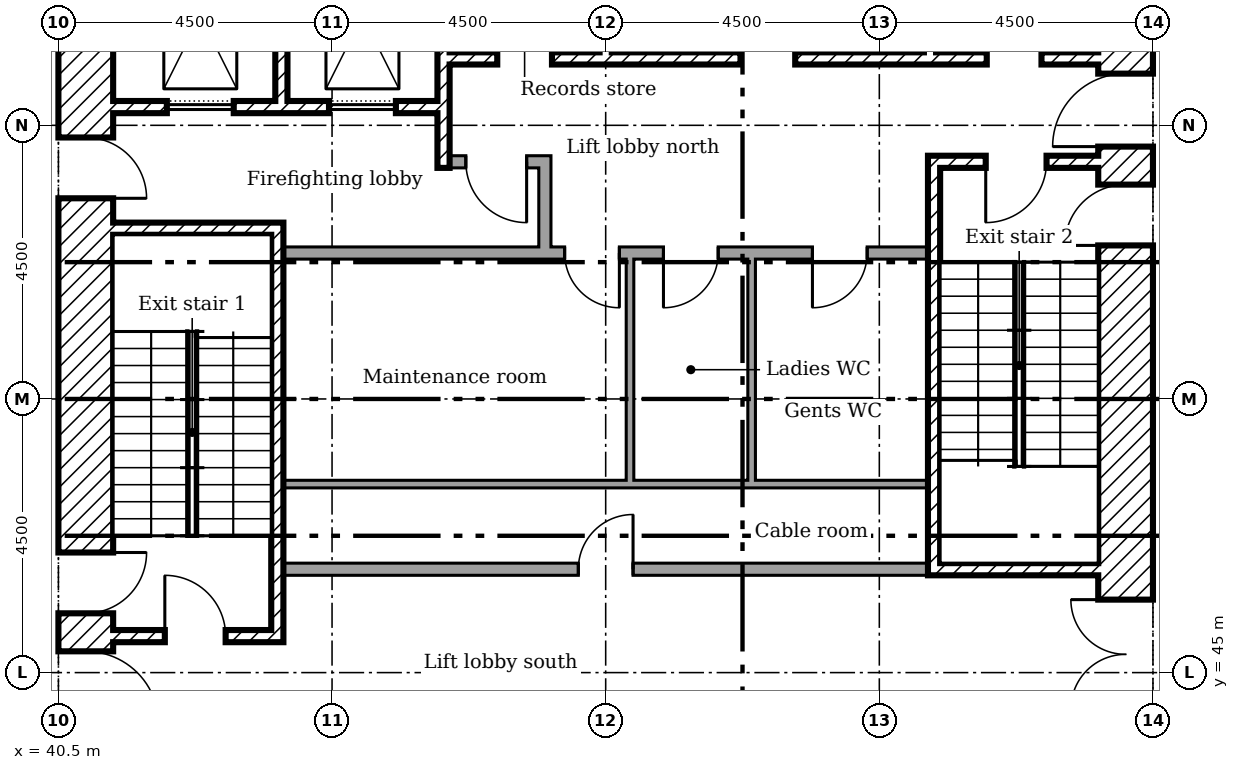
"""IFC4 building model, lengths in metres.
Left out: names, types, materials, properties, quantities, classifications, styles, units other than length and angle.
Written with IfcOpenShell. Run it as: python <this file> out.ifc"""

import sys

from ifc_helpers import new_model, si_unit, direction, frame, frame_2d, origin, place, context, subcontext, project, spatial, rectangle, extrude, element, fill, save


model = new_model("IFC4")
c1 = context("Model", 3, precision=1e-05, world=origin(), true_north=direction((0.0, 1.0)))
c2 = subcontext(c1, "Body", "Model", "MODEL_VIEW")
j1 = project(units=[si_unit("LENGTHUNIT", "METRE"), si_unit("PLANEANGLEUNIT", "RADIAN")], contexts=[c1])
p1 = place(None, origin())
s1 = spatial("IfcSite", under=j1, at=p1, CompositionType="ELEMENT")
p2 = place(p1, origin())
s2 = spatial("IfcBuilding", under=s1, at=p2, CompositionType="ELEMENT")
p3 = place(p2, frame((0.0, 0.0, 38.6)))
s3 = spatial("IfcBuildingStorey", under=s2, at=p3, CompositionType="ELEMENT", Elevation=38.6)
p4 = place(p3, frame((58.05, 40.5, 0.0), z_axis=(0.0, 0.0, 1.0), x_axis=(0.0, 1.0, 0.0)))
e1 = element("IfcWall", 1, at=p4, inside=s3, PredefinedType="SHEAR", context=c2, shape_type="SweptSolid", body=[
    extrude(rectangle(XDim=18.0, YDim=0.9, at=frame_2d((9.0, 0.0))), origin(), (0.0, 0.0, 1.0), 4.125),
])
p5 = place(p4, frame((13.15, 0.0, 0.0)))
e2 = element("IfcOpeningElement", 2, at=p5, cuts=e1, PredefinedType="OPENING", context=c2, shape_type="SweptSolid", body=[
    extrude(rectangle(XDim=1.2, YDim=2.1, at=frame_2d((0.6, 1.05))), frame((0.0, 0.46, 0.0), z_axis=(0.0, -1.0, 0.0), x_axis=(1.0, 0.0, 0.0)), (0.0, 0.0, 1.0), 0.92),
])
p6 = place(p4, frame((3.9, 0.0, 0.0)))
e3 = element("IfcOpeningElement", 3, at=p6, cuts=e1, PredefinedType="OPENING", context=c2, shape_type="SweptSolid", body=[
    extrude(rectangle(XDim=1.8, YDim=2.1, at=frame_2d((0.9, 1.05))), frame((0.0, 0.46, 0.0), z_axis=(0.0, -1.0, 0.0), x_axis=(1.0, 0.0, 0.0)), (0.0, 0.0, 1.0), 0.92),
])
p7 = place(p4, frame((11.525, 0.0, 0.0)))
e4 = element("IfcOpeningElement", 4, at=p7, cuts=e1, PredefinedType="OPENING", context=c2, shape_type="SweptSolid", body=[
    extrude(rectangle(XDim=1.0, YDim=2.1, at=frame_2d((0.5, 1.05))), frame((0.0, 0.46, 0.0), z_axis=(0.0, -1.0, 0.0), x_axis=(1.0, 0.0, 0.0)), (0.0, 0.0, 1.0), 0.92),
])
p8 = place(p3, frame((40.95, 40.5, 0.0), z_axis=(0.0, 0.0, 1.0), x_axis=(0.0, 1.0, 0.0)))
e5 = element("IfcWall", 5, at=p8, inside=s3, PredefinedType="SHEAR", context=c2, shape_type="SweptSolid", body=[
    extrude(rectangle(XDim=18.0, YDim=0.9, at=frame_2d((9.0, 0.0))), origin(), (0.0, 0.0, 1.0), 4.125),
])
p9 = place(p8, frame((3.65, 0.0, 0.0)))
e6 = element("IfcOpeningElement", 6, at=p9, cuts=e5, PredefinedType="OPENING", context=c2, shape_type="SweptSolid", body=[
    extrude(rectangle(XDim=1.2, YDim=2.1, at=frame_2d((0.6, 1.05))), frame((0.0, 0.46, 0.0), z_axis=(0.0, -1.0, 0.0), x_axis=(1.0, 0.0, 0.0)), (0.0, 0.0, 1.0), 0.92),
])
p10 = place(p8, frame((5.475, 0.0, 0.0)))
e7 = element("IfcOpeningElement", 7, at=p10, cuts=e5, PredefinedType="OPENING", context=c2, shape_type="SweptSolid", body=[
    extrude(rectangle(XDim=1.0, YDim=2.1, at=frame_2d((0.5, 1.05))), frame((0.0, 0.46, 0.0), z_axis=(0.0, -1.0, 0.0), x_axis=(1.0, 0.0, 0.0)), (0.0, 0.0, 1.0), 0.92),
])
p11 = place(p8, frame((12.3, 0.0, 0.0)))
e8 = element("IfcOpeningElement", 8, at=p11, cuts=e5, PredefinedType="OPENING", context=c2, shape_type="SweptSolid", body=[
    extrude(rectangle(XDim=1.0, YDim=2.1, at=frame_2d((0.5, 1.05))), frame((0.0, 0.46, 0.0), z_axis=(0.0, -1.0, 0.0), x_axis=(1.0, 0.0, 0.0)), (0.0, 0.0, 1.0), 0.92),
])
p12 = place(p3, frame((44.167, 57.6, 0.0), z_axis=(0.0, 0.0, 1.0), x_axis=(0.0, -1.0, 0.0)))
e9 = element("IfcWall", 9, at=p12, inside=s3, PredefinedType="SHEAR", context=c2, shape_type="SweptSolid", body=[
    extrude(rectangle(XDim=3.2, YDim=0.2, at=frame_2d((1.6, 0.0))), origin(), (0.0, 0.0, 1.0), 4.125),
])
p13 = place(p3, frame((46.833, 57.6, 0.0), z_axis=(0.0, 0.0, 1.0), x_axis=(0.0, -1.0, 0.0)))
e10 = element("IfcWall", 10, at=p13, inside=s3, PredefinedType="SHEAR", context=c2, shape_type="SweptSolid", body=[
    extrude(rectangle(XDim=4.3, YDim=0.2, at=frame_2d((2.15, 0.0))), origin(), (0.0, 0.0, 1.0), 4.125),
])
for number, where, z_axis, x_axis in (
    (11, (49.5, 57.6, 0.0), (0.0, 0.0, 1.0), (0.0, -1.0, 0.0)),
    (12, (54.833, 57.6, 0.0), (0.0, 0.0, 1.0), (0.0, -1.0, 0.0)),
):
    element("IfcWall", number, at=place(p3, frame(where, z_axis=z_axis, x_axis=x_axis)), inside=s3, PredefinedType="SHEAR", context=c2, shape_type="SweptSolid", body=[
        extrude(rectangle(XDim=2.4, YDim=0.2, at=frame_2d((1.2, 0.0))), origin(), (0.0, 0.0, 1.0), 4.125),
    ])
p14 = place(p3, frame((48.5, 51.9, 0.0), z_axis=(0.0, 0.0, 1.0), x_axis=(0.0, 1.0, 0.0)))
e13 = element("IfcWall", 13, at=p14, inside=s3, PredefinedType="PARTITIONING", context=c2, shape_type="SweptSolid", body=[
    extrude(rectangle(XDim=1.6, YDim=0.2, at=frame_2d((0.8, 0.0))), origin(), (0.0, 0.0, 1.0), 4.125),
])
p15 = place(p3, frame((46.933, 53.4, 0.0)))
e14 = element("IfcWall", 14, at=p15, inside=s3, PredefinedType="PARTITIONING", context=c2, shape_type="SweptSolid", body=[
    extrude(rectangle(XDim=1.467, YDim=0.2, at=frame_2d((0.733, 0.0))), origin(), (0.0, 0.0, 1.0), 4.125),
])
p16 = place(p15, frame((0.267, 0.0, 0.0)))
e15 = element("IfcOpeningElement", 15, at=p16, cuts=e14, PredefinedType="OPENING", context=c2, shape_type="SweptSolid", body=[
    extrude(rectangle(XDim=1.0, YDim=2.1, at=frame_2d((0.5, 1.05))), frame((0.0, 0.11, 0.0), z_axis=(0.0, -1.0, 0.0), x_axis=(1.0, 0.0, 0.0)), (0.0, 0.0, 1.0), 0.22),
])
p17 = place(p3, frame((46.933, 55.1, 0.0)))
e16 = element("IfcWall", 16, at=p17, inside=s3, PredefinedType="SHEAR", context=c2, shape_type="SweptSolid", body=[
    extrude(rectangle(XDim=10.667, YDim=0.2, at=frame_2d((5.333, 0.0))), origin(), (0.0, 0.0, 1.0), 4.125),
])
p18 = place(p17, frame((8.833, 0.0, 0.0)))
e17 = element("IfcOpeningElement", 17, at=p18, cuts=e16, PredefinedType="OPENING", context=c2, shape_type="SweptSolid", body=[
    extrude(rectangle(XDim=0.9, YDim=2.1, at=frame_2d((0.45, 1.05))), frame((0.0, 0.11, 0.0), z_axis=(0.0, -1.0, 0.0), x_axis=(1.0, 0.0, 0.0)), (0.0, 0.0, 1.0), 0.22),
])
p19 = place(p17, frame((0.783, 0.0, 0.0)))
e18 = element("IfcOpeningElement", 18, at=p19, cuts=e16, PredefinedType="OPENING", context=c2, shape_type="SweptSolid", body=[
    extrude(rectangle(XDim=0.9, YDim=2.1, at=frame_2d((0.45, 1.05))), frame((0.0, 0.11, 0.0), z_axis=(0.0, -1.0, 0.0), x_axis=(1.0, 0.0, 0.0)), (0.0, 0.0, 1.0), 0.22),
])
p20 = place(p17, frame((4.783, 0.0, 0.0)))
e19 = element("IfcOpeningElement", 19, at=p20, cuts=e16, PredefinedType="OPENING", context=c2, shape_type="SweptSolid", body=[
    extrude(rectangle(XDim=0.9, YDim=2.1, at=frame_2d((0.45, 1.05))), frame((0.0, 0.11, 0.0), z_axis=(0.0, -1.0, 0.0), x_axis=(1.0, 0.0, 0.0)), (0.0, 0.0, 1.0), 0.22),
])
p21 = place(p3, frame((41.4, 54.3, 0.0)))
e20 = element("IfcWall", 20, at=p21, inside=s3, PredefinedType="SHEAR", context=c2, shape_type="SweptSolid", body=[
    extrude(rectangle(XDim=5.333, YDim=0.2, at=frame_2d((2.667, 0.0))), origin(), (0.0, 0.0, 1.0), 4.125),
])
p22 = place(p21, frame((0.883, 0.0, 0.0)))
e21 = element("IfcOpeningElement", 21, at=p22, cuts=e20, PredefinedType="OPENING", context=c2, shape_type="SweptSolid", body=[
    extrude(rectangle(XDim=1.1, YDim=2.1, at=frame_2d((0.55, 1.05))), frame((0.0, 0.11, 0.0), z_axis=(0.0, -1.0, 0.0), x_axis=(1.0, 0.0, 0.0)), (0.0, 0.0, 1.0), 0.22),
])
p23 = place(p21, frame((3.55, 0.0, 0.0)))
e22 = element("IfcOpeningElement", 22, at=p23, cuts=e20, PredefinedType="OPENING", context=c2, shape_type="SweptSolid", body=[
    extrude(rectangle(XDim=1.1, YDim=2.1, at=frame_2d((0.55, 1.05))), frame((0.0, 0.11, 0.0), z_axis=(0.0, -1.0, 0.0), x_axis=(1.0, 0.0, 0.0)), (0.0, 0.0, 1.0), 0.22),
])
p24 = place(p3, frame((44.1, 45.5, 0.0), z_axis=(0.0, 0.0, 1.0), x_axis=(0.0, 1.0, 0.0)))
e23 = element("IfcWall", 23, at=p24, inside=s3, PredefinedType="SHEAR", context=c2, shape_type="SweptSolid", body=[
    extrude(rectangle(XDim=6.9, YDim=0.2, at=frame_2d((3.45, 0.0))), origin(), (0.0, 0.0, 1.0), 4.125),
])
p25 = place(p3, frame((41.4, 52.3, 0.0)))
e24 = element("IfcWall", 24, at=p25, inside=s3, PredefinedType="SHEAR", context=c2, shape_type="SweptSolid", body=[
    extrude(rectangle(XDim=2.6, YDim=0.2, at=frame_2d((1.3, 0.0))), origin(), (0.0, 0.0, 1.0), 4.125),
])
p26 = place(p3, frame((41.4, 45.6, 0.0)))
e25 = element("IfcWall", 25, at=p26, inside=s3, PredefinedType="SHEAR", context=c2, shape_type="SweptSolid", body=[
    extrude(rectangle(XDim=2.6, YDim=0.2, at=frame_2d((1.3, 0.0))), origin(), (0.0, 0.0, 1.0), 4.125),
])
p27 = place(p26, frame((0.85, 0.0, 0.0)))
e26 = element("IfcOpeningElement", 26, at=p27, cuts=e25, PredefinedType="OPENING", context=c2, shape_type="SweptSolid", body=[
    extrude(rectangle(XDim=1.0, YDim=2.1, at=frame_2d((0.5, 1.05))), frame((0.0, 0.11, 0.0), z_axis=(0.0, -1.0, 0.0), x_axis=(1.0, 0.0, 0.0)), (0.0, 0.0, 1.0), 0.22),
])
p28 = place(p3, frame((54.8, 53.4, 0.0)))
e27 = element("IfcWall", 27, at=p28, inside=s3, PredefinedType="SHEAR", context=c2, shape_type="SweptSolid", body=[
    extrude(rectangle(XDim=2.8, YDim=0.2, at=frame_2d((1.4, 0.0))), origin(), (0.0, 0.0, 1.0), 4.125),
])
p29 = place(p28, frame((0.95, 0.0, 0.0)))
e28 = element("IfcOpeningElement", 28, at=p29, cuts=e27, PredefinedType="OPENING", context=c2, shape_type="SweptSolid", body=[
    extrude(rectangle(XDim=1.0, YDim=2.1, at=frame_2d((0.5, 1.05))), frame((0.0, 0.11, 0.0), z_axis=(0.0, -1.0, 0.0), x_axis=(1.0, 0.0, 0.0)), (0.0, 0.0, 1.0), 0.22),
])
p30 = place(p3, frame((54.8, 46.7, 0.0)))
e29 = element("IfcWall", 29, at=p30, inside=s3, PredefinedType="SHEAR", context=c2, shape_type="SweptSolid", body=[
    extrude(rectangle(XDim=2.8, YDim=0.2, at=frame_2d((1.4, 0.0))), origin(), (0.0, 0.0, 1.0), 4.125),
])
p31 = place(p3, frame((54.9, 46.8, 0.0), z_axis=(0.0, 0.0, 1.0), x_axis=(0.0, 1.0, 0.0)))
e30 = element("IfcWall", 30, at=p31, inside=s3, PredefinedType="SHEAR", context=c2, shape_type="SweptSolid", body=[
    extrude(rectangle(XDim=6.5, YDim=0.2, at=frame_2d((3.25, 0.0))), origin(), (0.0, 0.0, 1.0), 4.125),
])
p32 = place(p3, frame((44.2, 51.9, 0.0)))
e31 = element("IfcWall", 31, at=p32, inside=s3, PredefinedType="PARTITIONING", context=c2, shape_type="SweptSolid", body=[
    extrude(rectangle(XDim=10.6, YDim=0.2, at=frame_2d((5.3, 0.0))), origin(), (0.0, 0.0, 1.0), 4.125),
])
p33 = place(p32, frame((4.625, 0.0, 0.0)))
e32 = element("IfcOpeningElement", 32, at=p33, cuts=e31, PredefinedType="OPENING", context=c2, shape_type="SweptSolid", body=[
    extrude(rectangle(XDim=0.9, YDim=2.1, at=frame_2d((0.45, 1.05))), frame((0.0, 0.11, 0.0), z_axis=(0.0, -1.0, 0.0), x_axis=(1.0, 0.0, 0.0)), (0.0, 0.0, 1.0), 0.22),
])
p34 = place(p32, frame((6.25, 0.0, 0.0)))
e33 = element("IfcOpeningElement", 33, at=p34, cuts=e31, PredefinedType="OPENING", context=c2, shape_type="SweptSolid", body=[
    extrude(rectangle(XDim=0.9, YDim=2.1, at=frame_2d((0.45, 1.05))), frame((0.0, 0.11, 0.0), z_axis=(0.0, -1.0, 0.0), x_axis=(1.0, 0.0, 0.0)), (0.0, 0.0, 1.0), 0.22),
])
p35 = place(p32, frame((8.7, 0.0, 0.0)))
e34 = element("IfcOpeningElement", 34, at=p35, cuts=e31, PredefinedType="OPENING", context=c2, shape_type="SweptSolid", body=[
    extrude(rectangle(XDim=0.9, YDim=2.1, at=frame_2d((0.45, 1.05))), frame((0.0, 0.11, 0.0), z_axis=(0.0, -1.0, 0.0), x_axis=(1.0, 0.0, 0.0)), (0.0, 0.0, 1.0), 0.22),
])
p36 = place(p3, frame((44.2, 46.7, 0.0)))
e35 = element("IfcWall", 35, at=p36, inside=s3, PredefinedType="PARTITIONING", context=c2, shape_type="SweptSolid", body=[
    extrude(rectangle(XDim=10.6, YDim=0.2, at=frame_2d((5.3, 0.0))), origin(), (0.0, 0.0, 1.0), 4.125),
])
p37 = place(p36, frame((4.85, 0.0, 0.0)))
e36 = element("IfcOpeningElement", 36, at=p37, cuts=e35, PredefinedType="OPENING", context=c2, shape_type="SweptSolid", body=[
    extrude(rectangle(XDim=0.9, YDim=2.1, at=frame_2d((0.45, 1.05))), frame((0.0, 0.11, 0.0), z_axis=(0.0, -1.0, 0.0), x_axis=(1.0, 0.0, 0.0)), (0.0, 0.0, 1.0), 0.22),
])
p38 = place(p3, frame((49.962, 48.1, 0.0), z_axis=(0.0, 0.0, 1.0), x_axis=(-1.0, 0.0, 0.0)))
e37 = element("IfcWall", 37, at=p38, inside=s3, PredefinedType="PARTITIONING", context=c2, shape_type="SweptSolid", body=[
    extrude(rectangle(XDim=5.762, YDim=0.125, at=frame_2d((2.881, 0.0))), origin(), (0.0, 0.0, 1.0), 4.125),
])
p39 = place(p3, frame((51.962, 48.1, 0.0), z_axis=(0.0, 0.0, 1.0), x_axis=(-1.0, 0.0, 0.0)))
e38 = element("IfcWall", 38, at=p39, inside=s3, PredefinedType="PARTITIONING", context=c2, shape_type="SweptSolid", body=[
    extrude(rectangle(XDim=2.062, YDim=0.125, at=frame_2d((1.031, 0.0))), origin(), (0.0, 0.0, 1.0), 4.125),
])
p40 = place(p3, frame((49.9, 48.163, 0.0), z_axis=(0.0, 0.0, 1.0), x_axis=(0.0, 1.0, 0.0)))
e39 = element("IfcWall", 39, at=p40, inside=s3, PredefinedType="PARTITIONING", context=c2, shape_type="SweptSolid", body=[
    extrude(rectangle(XDim=3.637, YDim=0.125, at=frame_2d((1.819, 0.0))), origin(), (0.0, 0.0, 1.0), 4.125),
])
p41 = place(p3, frame((54.8, 48.1, 0.0), z_axis=(0.0, 0.0, 1.0), x_axis=(-1.0, 0.0, 0.0)))
e40 = element("IfcWall", 40, at=p41, inside=s3, PredefinedType="PARTITIONING", context=c2, shape_type="SweptSolid", body=[
    extrude(rectangle(XDim=2.9, YDim=0.125, at=frame_2d((1.45, 0.0))), origin(), (0.0, 0.0, 1.0), 4.125),
])
p42 = place(p3, frame((51.9, 48.163, 0.0), z_axis=(0.0, 0.0, 1.0), x_axis=(0.0, 1.0, 0.0)))
e41 = element("IfcWall", 41, at=p42, inside=s3, PredefinedType="PARTITIONING", context=c2, shape_type="SweptSolid", body=[
    extrude(rectangle(XDim=3.637, YDim=0.125, at=frame_2d((1.819, 0.0))), origin(), (0.0, 0.0, 1.0), 4.125),
])
p43 = place(p5, origin())
e42 = element("IfcDoor", 42, at=p43, inside=s3, OperationType="SINGLE_SWING_RIGHT", PredefinedType="DOOR", context=c2, shape_type="SweptSolid", body=[
    extrude(rectangle(XDim=1.2, YDim=2.1, at=frame_2d((0.6, 1.05))), frame((0.0, 0.025, 0.0), z_axis=(0.0, -1.0, 0.0), x_axis=(1.0, 0.0, 0.0)), (0.0, 0.0, 1.0), 0.05),
])
fill(e2, e42)
p44 = place(p6, origin())
e43 = element("IfcDoor", 43, at=p44, inside=s3, OperationType="DOUBLE_DOOR_SINGLE_SWING", PredefinedType="DOOR", context=c2, shape_type="SweptSolid", body=[
    extrude(rectangle(XDim=1.8, YDim=2.1, at=frame_2d((0.9, 1.05))), frame((0.0, 0.025, 0.0), z_axis=(0.0, -1.0, 0.0), x_axis=(1.0, 0.0, 0.0)), (0.0, 0.0, 1.0), 0.05),
])
fill(e3, e43)
p45 = place(p9, frame((1.2, 0.0, 0.0), x_axis=(-1.0, 0.0, 0.0)))
e44 = element("IfcDoor", 44, at=p45, inside=s3, OperationType="SINGLE_SWING_LEFT", PredefinedType="DOOR", context=c2, shape_type="SweptSolid", body=[
    extrude(rectangle(XDim=1.2, YDim=2.1, at=frame_2d((0.6, 1.05))), frame((0.0, 0.025, 0.0), z_axis=(0.0, -1.0, 0.0), x_axis=(1.0, 0.0, 0.0)), (0.0, 0.0, 1.0), 0.05),
])
fill(e6, e44)
p46 = place(p27, origin())
e45 = element("IfcDoor", 45, at=p46, inside=s3, OperationType="SINGLE_SWING_RIGHT", PredefinedType="DOOR", context=c2, shape_type="SweptSolid", body=[
    extrude(rectangle(XDim=1.0, YDim=2.1, at=frame_2d((0.5, 1.05))), frame((0.0, 0.025, 0.0), z_axis=(0.0, -1.0, 0.0), x_axis=(1.0, 0.0, 0.0)), (0.0, 0.0, 1.0), 0.05),
])
fill(e26, e45)
p47 = place(p10, frame((1.0, 0.0, 0.0), x_axis=(-1.0, 0.0, 0.0)))
e46 = element("IfcDoor", 46, at=p47, inside=s3, OperationType="SINGLE_SWING_RIGHT", PredefinedType="DOOR", context=c2, shape_type="SweptSolid", body=[
    extrude(rectangle(XDim=1.0, YDim=2.1, at=frame_2d((0.5, 1.05))), frame((0.0, 0.025, 0.0), z_axis=(0.0, -1.0, 0.0), x_axis=(1.0, 0.0, 0.0)), (0.0, 0.0, 1.0), 0.05),
])
fill(e7, e46)
p48 = place(p29, frame((1.0, 0.0, 0.0), x_axis=(-1.0, 0.0, 0.0)))
e47 = element("IfcDoor", 47, at=p48, inside=s3, OperationType="SINGLE_SWING_LEFT", PredefinedType="DOOR", context=c2, shape_type="SweptSolid", body=[
    extrude(rectangle(XDim=1.0, YDim=2.1, at=frame_2d((0.5, 1.05))), frame((0.0, 0.025, 0.0), z_axis=(0.0, -1.0, 0.0), x_axis=(1.0, 0.0, 0.0)), (0.0, 0.0, 1.0), 0.05),
])
fill(e28, e47)
p49 = place(p7, origin())
e48 = element("IfcDoor", 48, at=p49, inside=s3, OperationType="SINGLE_SWING_RIGHT", PredefinedType="DOOR", context=c2, shape_type="SweptSolid", body=[
    extrude(rectangle(XDim=1.0, YDim=2.1, at=frame_2d((0.5, 1.05))), frame((0.0, 0.025, 0.0), z_axis=(0.0, -1.0, 0.0), x_axis=(1.0, 0.0, 0.0)), (0.0, 0.0, 1.0), 0.05),
])
fill(e4, e48)
p50 = place(p16, frame((1.0, 0.0, 0.0), x_axis=(-1.0, 0.0, 0.0)))
e49 = element("IfcDoor", 49, at=p50, inside=s3, OperationType="SINGLE_SWING_RIGHT", PredefinedType="DOOR", context=c2, shape_type="SweptSolid", body=[
    extrude(rectangle(XDim=1.0, YDim=2.1, at=frame_2d((0.5, 1.05))), frame((0.0, 0.025, 0.0), z_axis=(0.0, -1.0, 0.0), x_axis=(1.0, 0.0, 0.0)), (0.0, 0.0, 1.0), 0.05),
])
fill(e15, e49)
p51 = place(p11, frame((1.0, 0.0, 0.0), x_axis=(-1.0, 0.0, 0.0)))
e50 = element("IfcDoor", 50, at=p51, inside=s3, OperationType="SINGLE_SWING_LEFT", PredefinedType="DOOR", context=c2, shape_type="SweptSolid", body=[
    extrude(rectangle(XDim=1.0, YDim=2.1, at=frame_2d((0.5, 1.05))), frame((0.0, 0.025, 0.0), z_axis=(0.0, -1.0, 0.0), x_axis=(1.0, 0.0, 0.0)), (0.0, 0.0, 1.0), 0.05),
])
fill(e8, e50)
p52 = place(p18, origin())
e51 = element("IfcDoor", 51, at=p52, inside=s3, OperationType="SINGLE_SWING_RIGHT", PredefinedType="DOOR", context=c2, shape_type="SweptSolid", body=[
    extrude(rectangle(XDim=0.9, YDim=2.1, at=frame_2d((0.45, 1.05))), frame((0.0, 0.025, 0.0), z_axis=(0.0, -1.0, 0.0), x_axis=(1.0, 0.0, 0.0)), (0.0, 0.0, 1.0), 0.05),
])
fill(e17, e51)
p53 = place(p19, origin())
e52 = element("IfcDoor", 52, at=p53, inside=s3, OperationType="SINGLE_SWING_RIGHT", PredefinedType="DOOR", context=c2, shape_type="SweptSolid", body=[
    extrude(rectangle(XDim=0.9, YDim=2.1, at=frame_2d((0.45, 1.05))), frame((0.0, 0.025, 0.0), z_axis=(0.0, -1.0, 0.0), x_axis=(1.0, 0.0, 0.0)), (0.0, 0.0, 1.0), 0.05),
])
fill(e18, e52)
p54 = place(p20, origin())
e53 = element("IfcDoor", 53, at=p54, inside=s3, OperationType="SINGLE_SWING_RIGHT", PredefinedType="DOOR", context=c2, shape_type="SweptSolid", body=[
    extrude(rectangle(XDim=0.9, YDim=2.1, at=frame_2d((0.45, 1.05))), frame((0.0, 0.025, 0.0), z_axis=(0.0, -1.0, 0.0), x_axis=(1.0, 0.0, 0.0)), (0.0, 0.0, 1.0), 0.05),
])
fill(e19, e53)
p55 = place(p37, origin())
e54 = element("IfcDoor", 54, at=p55, inside=s3, OperationType="SINGLE_SWING_LEFT", PredefinedType="DOOR", context=c2, shape_type="SweptSolid", body=[
    extrude(rectangle(XDim=0.9, YDim=2.1, at=frame_2d((0.45, 1.05))), frame((0.0, 0.025, 0.0), z_axis=(0.0, -1.0, 0.0), x_axis=(1.0, 0.0, 0.0)), (0.0, 0.0, 1.0), 0.05),
])
fill(e36, e54)
p56 = place(p33, frame((0.9, 0.0, 0.0), x_axis=(-1.0, 0.0, 0.0)))
e55 = element("IfcDoor", 55, at=p56, inside=s3, OperationType="SINGLE_SWING_RIGHT", PredefinedType="DOOR", context=c2, shape_type="SweptSolid", body=[
    extrude(rectangle(XDim=0.9, YDim=2.1, at=frame_2d((0.45, 1.05))), frame((0.0, 0.025, 0.0), z_axis=(0.0, -1.0, 0.0), x_axis=(1.0, 0.0, 0.0)), (0.0, 0.0, 1.0), 0.05),
])
fill(e32, e55)
p57 = place(p34, frame((0.9, 0.0, 0.0), x_axis=(-1.0, 0.0, 0.0)))
e56 = element("IfcDoor", 56, at=p57, inside=s3, OperationType="SINGLE_SWING_LEFT", PredefinedType="DOOR", context=c2, shape_type="SweptSolid", body=[
    extrude(rectangle(XDim=0.9, YDim=2.1, at=frame_2d((0.45, 1.05))), frame((0.0, 0.025, 0.0), z_axis=(0.0, -1.0, 0.0), x_axis=(1.0, 0.0, 0.0)), (0.0, 0.0, 1.0), 0.05),
])
fill(e33, e56)
p58 = place(p35, frame((0.9, 0.0, 0.0), x_axis=(-1.0, 0.0, 0.0)))
e57 = element("IfcDoor", 57, at=p58, inside=s3, OperationType="SINGLE_SWING_LEFT", PredefinedType="DOOR", context=c2, shape_type="SweptSolid", body=[
    extrude(rectangle(XDim=0.9, YDim=2.1, at=frame_2d((0.45, 1.05))), frame((0.0, 0.025, 0.0), z_axis=(0.0, -1.0, 0.0), x_axis=(1.0, 0.0, 0.0)), (0.0, 0.0, 1.0), 0.05),
])
fill(e34, e57)
p59 = place(p22, origin())
e58 = element("IfcDoor", 58, at=p59, inside=s3, OperationType="SLIDING_TO_LEFT", PredefinedType="DOOR", context=c2, shape_type="SweptSolid", body=[
    extrude(rectangle(XDim=1.1, YDim=2.1, at=frame_2d((0.55, 1.05))), frame((0.0, 0.025, 0.0), z_axis=(0.0, -1.0, 0.0), x_axis=(1.0, 0.0, 0.0)), (0.0, 0.0, 1.0), 0.05),
])
fill(e21, e58)
p60 = place(p23, origin())
e59 = element("IfcDoor", 59, at=p60, inside=s3, OperationType="SLIDING_TO_LEFT", PredefinedType="DOOR", context=c2, shape_type="SweptSolid", body=[
    extrude(rectangle(XDim=1.1, YDim=2.1, at=frame_2d((0.55, 1.05))), frame((0.0, 0.025, 0.0), z_axis=(0.0, -1.0, 0.0), x_axis=(1.0, 0.0, 0.0)), (0.0, 0.0, 1.0), 0.05),
])
fill(e22, e59)
save(model, sys.argv[1])
